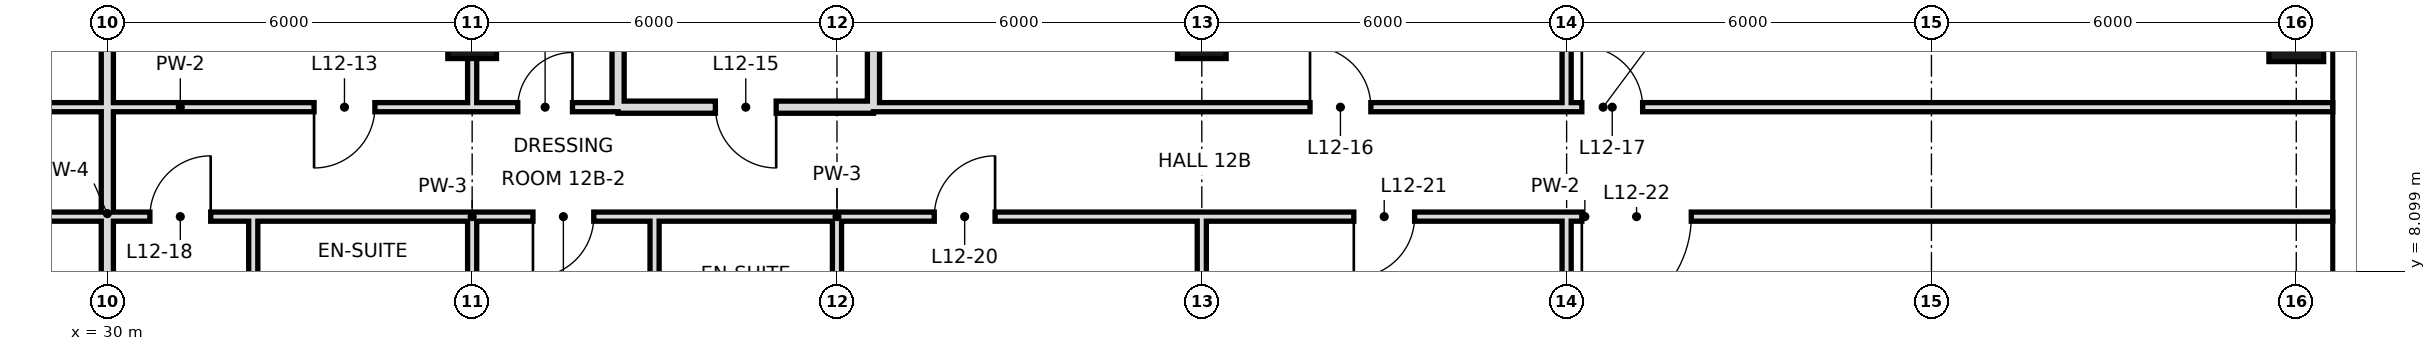
"""IFC4 building model, lengths in metres.
Left out: names, types, materials, properties, quantities, classifications, styles, units other than length and angle.
Written with IfcOpenShell. Run it as: python <this file> out.ifc"""

import sys

from ifc_helpers import new_model, si_unit, direction, frame, frame_2d, origin, origin_2d, place, context, subcontext, project, spatial, rectangle, hollow_rectangle, extrude, element, fill, save


model = new_model("IFC4")
c1 = context("Model", 3, precision=1e-05, world=origin(), true_north=direction((0.0, 1.0)))
c2 = subcontext(c1, "Body", "Model", "MODEL_VIEW")
j1 = project(units=[si_unit("LENGTHUNIT", "METRE"), si_unit("PLANEANGLEUNIT", "RADIAN")], contexts=[c1])
p1 = place(None, origin())
s1 = spatial("IfcSite", under=j1, at=p1, CompositionType="ELEMENT")
p2 = place(p1, origin())
s2 = spatial("IfcBuilding", under=s1, at=p2, CompositionType="ELEMENT")
p3 = place(p2, frame((0.0, 0.0, 64.2)))
s3 = spatial("IfcBuildingStorey", under=s2, at=p3, CompositionType="ELEMENT", Elevation=64.2)
for number, where, z_axis, x_axis in (
    (1, (36.0, 12.0, 0.0), (0.0, 0.0, 1.0), (1.0, 0.0, 0.0)),
    (2, (48.0, 12.0, 0.0), (0.0, 0.0, 1.0), (1.0, 0.0, 0.0)),
):
    element("IfcColumn", number, at=place(p3, frame(where, z_axis=z_axis, x_axis=x_axis)), inside=s3, PredefinedType="COLUMN", context=c2, shape_type="SweptSolid", body=[
        extrude(hollow_rectangle(XDim=0.8, YDim=0.8, WallThickness=0.04, at=origin_2d()), origin(), (0.0, 0.0, 1.0), 3.6),
    ])
p4 = place(p3, frame((66.0, 12.0, 0.0), z_axis=(0.0, 0.0, 1.0), x_axis=(1.0, 0.0, 0.0)))
e3 = element("IfcColumn", 3, at=p4, inside=s3, PredefinedType="COLUMN", context=c2, shape_type="SweptSolid", body=[
    extrude(hollow_rectangle(XDim=0.9, YDim=0.9, WallThickness=0.045, at=origin_2d()), origin(), (0.0, 0.0, 1.0), 3.6),
])
p5 = place(p3, frame((30.0, -0.6, 0.0), z_axis=(0.0, 0.0, 1.0), x_axis=(0.0, 1.0, 0.0)))
e4 = element("IfcWall", 4, at=p5, inside=s3, PredefinedType="SOLIDWALL", context=c2, shape_type="SweptSolid", body=[
    extrude(rectangle(XDim=19.3, YDim=0.2, at=frame_2d((9.65, 0.0))), origin(), (0.0, 0.0, 1.0), 2.72),
])
p6 = place(p3, frame((32.4, 6.0, 0.0), z_axis=(0.0, 0.0, 1.0), x_axis=(0.0, 1.0, 0.0)))
e5 = element("IfcWall", 5, at=p6, inside=s3, PredefinedType="PARTITIONING", context=c2, shape_type="SweptSolid", body=[
    extrude(rectangle(XDim=3.0, YDim=0.15, at=frame_2d((1.5, 0.0))), origin(), (0.0, 0.0, 1.0), 3.42),
])
p7 = place(p3, frame((36.0, 6.0, 0.0), z_axis=(0.0, 0.0, 1.0), x_axis=(0.0, 1.0, 0.0)))
e6 = element("IfcWall", 6, at=p7, inside=s3, PredefinedType="PARTITIONING", context=c2, shape_type="SweptSolid", body=[
    extrude(rectangle(XDim=3.0, YDim=0.15, at=frame_2d((1.5, 0.0))), origin(), (0.0, 0.0, 1.0), 2.72),
])
p8 = place(p3, frame((36.0, 10.8, 0.0), z_axis=(0.0, 0.0, 1.0), x_axis=(0.0, 1.0, 0.0)))
e7 = element("IfcWall", 7, at=p8, inside=s3, PredefinedType="PARTITIONING", context=c2, shape_type="SweptSolid", body=[
    extrude(rectangle(XDim=7.9, YDim=0.15, at=frame_2d((3.95, 0.0))), origin(), (0.0, 0.0, 1.0), 2.72),
])
p9 = place(p3, frame((38.4, 10.8, 0.0), z_axis=(0.0, 0.0, 1.0), x_axis=(0.0, 1.0, 0.0)))
e8 = element("IfcWall", 8, at=p9, inside=s3, PredefinedType="SOLIDWALL", context=c2, shape_type="SweptSolid", body=[
    extrude(rectangle(XDim=7.9, YDim=0.2, at=frame_2d((3.95, 0.0))), origin(), (0.0, 0.0, 1.0), 2.72),
])
p10 = place(p3, frame((39.0, 6.0, 0.0), z_axis=(0.0, 0.0, 1.0), x_axis=(0.0, 1.0, 0.0)))
e9 = element("IfcWall", 9, at=p10, inside=s3, PredefinedType="PARTITIONING", context=c2, shape_type="SweptSolid", body=[
    extrude(rectangle(XDim=3.0, YDim=0.15, at=frame_2d((1.5, 0.0))), origin(), (0.0, 0.0, 1.0), 3.42),
])
p11 = place(p3, frame((42.0, 6.0, 0.0), z_axis=(0.0, 0.0, 1.0), x_axis=(0.0, 1.0, 0.0)))
e10 = element("IfcWall", 10, at=p11, inside=s3, PredefinedType="PARTITIONING", context=c2, shape_type="SweptSolid", body=[
    extrude(rectangle(XDim=3.0, YDim=0.15, at=frame_2d((1.5, 0.0))), origin(), (0.0, 0.0, 1.0), 2.72),
])
p12 = place(p3, frame((42.6, 10.8, 0.0), z_axis=(0.0, 0.0, 1.0), x_axis=(0.0, 1.0, 0.0)))
e11 = element("IfcWall", 11, at=p12, inside=s3, PredefinedType="SOLIDWALL", context=c2, shape_type="SweptSolid", body=[
    extrude(rectangle(XDim=7.9, YDim=0.2, at=frame_2d((3.95, 0.0))), origin(), (0.0, 0.0, 1.0), 2.72),
])
p13 = place(p3, frame((48.0, 0.0, 0.0), z_axis=(0.0, 0.0, 1.0), x_axis=(0.0, 1.0, 0.0)))
e12 = element("IfcWall", 12, at=p13, inside=s3, PredefinedType="PARTITIONING", context=c2, shape_type="SweptSolid", body=[
    extrude(rectangle(XDim=9.0, YDim=0.15, at=frame_2d((4.5, 0.0))), origin(), (0.0, 0.0, 1.0), 2.72),
])
p14 = place(p3, frame((54.0, -0.6, 0.0), z_axis=(0.0, 0.0, 1.0), x_axis=(0.0, 1.0, 0.0)))
e13 = element("IfcWall", 13, at=p14, inside=s3, PredefinedType="PARTITIONING", context=c2, shape_type="SweptSolid", body=[
    extrude(rectangle(XDim=9.6, YDim=0.15, at=frame_2d((4.8, 0.0))), origin(), (0.0, 0.0, 1.0), 3.42),
])
p15 = place(p3, frame((54.0, 10.8, 0.0), z_axis=(0.0, 0.0, 1.0), x_axis=(0.0, 1.0, 0.0)))
e14 = element("IfcWall", 14, at=p15, inside=s3, PredefinedType="PARTITIONING", context=c2, shape_type="SweptSolid", body=[
    extrude(rectangle(XDim=7.2, YDim=0.15, at=frame_2d((3.6, 0.0))), origin(), (0.0, 0.0, 1.0), 3.42),
])
p16 = place(p3, frame((38.4, 10.8, 0.0), z_axis=(0.0, 0.0, 1.0), x_axis=(1.0, 0.0, 0.0)))
e15 = element("IfcWall", 15, at=p16, inside=s3, PredefinedType="SOLIDWALL", context=c2, shape_type="SweptSolid", body=[
    extrude(rectangle(XDim=4.2, YDim=0.2, at=frame_2d((2.1, 0.0))), origin(), (0.0, 0.0, 1.0), 2.72),
])
p17 = place(p16, frame((1.6, 0.0, 0.0)))
e16 = element("IfcOpeningElement", 16, at=p17, cuts=e15, PredefinedType="OPENING", context=c2, shape_type="SweptSolid", body=[
    extrude(rectangle(XDim=1.0, YDim=2.4, at=frame_2d((0.5, 1.2))), frame((0.0, 0.11, 0.0), z_axis=(0.0, -1.0, 0.0), x_axis=(1.0, 0.0, 0.0)), (0.0, 0.0, 1.0), 0.22),
])
p18 = place(p3, frame((26.4, 10.8, 0.0), z_axis=(0.0, 0.0, 1.0), x_axis=(1.0, 0.0, 0.0)))
e17 = element("IfcWall", 17, at=p18, inside=s3, PredefinedType="PARTITIONING", context=c2, shape_type="SweptSolid", body=[
    extrude(rectangle(XDim=9.6, YDim=0.15, at=frame_2d((4.8, 0.0))), origin(), (0.0, 0.0, 1.0), 3.42),
])
p19 = place(p18, frame((1.3, 0.0, 0.0)))
e18 = element("IfcOpeningElement", 18, at=p19, cuts=e17, PredefinedType="OPENING", context=c2, shape_type="SweptSolid", body=[
    extrude(rectangle(XDim=1.0, YDim=2.4, at=frame_2d((0.5, 1.2))), frame((0.0, 0.085, 0.0), z_axis=(0.0, -1.0, 0.0), x_axis=(1.0, 0.0, 0.0)), (0.0, 0.0, 1.0), 0.17),
])
p20 = place(p18, frame((7.0, 0.0, 0.0)))
e19 = element("IfcOpeningElement", 19, at=p20, cuts=e17, PredefinedType="OPENING", context=c2, shape_type="SweptSolid", body=[
    extrude(rectangle(XDim=1.0, YDim=2.4, at=frame_2d((0.5, 1.2))), frame((0.0, 0.085, 0.0), z_axis=(0.0, -1.0, 0.0), x_axis=(1.0, 0.0, 0.0)), (0.0, 0.0, 1.0), 0.17),
])
p21 = place(p3, frame((42.6, 10.8, 0.0), z_axis=(0.0, 0.0, 1.0), x_axis=(1.0, 0.0, 0.0)))
e20 = element("IfcWall", 20, at=p21, inside=s3, PredefinedType="PARTITIONING", context=c2, shape_type="SweptSolid", body=[
    extrude(rectangle(XDim=24.0, YDim=0.15, at=frame_2d((12.0, 0.0))), origin(), (0.0, 0.0, 1.0), 3.42),
])
p22 = place(p21, frame((7.18, 0.0, 0.0)))
e21 = element("IfcOpeningElement", 21, at=p22, cuts=e20, PredefinedType="OPENING", context=c2, shape_type="SweptSolid", body=[
    extrude(rectangle(XDim=1.0, YDim=2.4, at=frame_2d((0.5, 1.2))), frame((0.0, 0.085, 0.0), z_axis=(0.0, -1.0, 0.0), x_axis=(1.0, 0.0, 0.0)), (0.0, 0.0, 1.0), 0.17),
])
p23 = place(p21, frame((11.65, 0.0, 0.0)))
e22 = element("IfcOpeningElement", 22, at=p23, cuts=e20, PredefinedType="OPENING", context=c2, shape_type="SweptSolid", body=[
    extrude(rectangle(XDim=1.0, YDim=2.4, at=frame_2d((0.5, 1.2))), frame((0.0, 0.085, 0.0), z_axis=(0.0, -1.0, 0.0), x_axis=(1.0, 0.0, 0.0)), (0.0, 0.0, 1.0), 0.17),
])
p24 = place(p3, frame((36.0, 10.8, 0.0), z_axis=(0.0, 0.0, 1.0), x_axis=(1.0, 0.0, 0.0)))
e23 = element("IfcWall", 23, at=p24, inside=s3, PredefinedType="PARTITIONING", context=c2, shape_type="SweptSolid", body=[
    extrude(rectangle(XDim=2.4, YDim=0.15, at=frame_2d((1.2, 0.0))), origin(), (0.0, 0.0, 1.0), 3.42),
])
p25 = place(p24, frame((0.75, 0.0, 0.0)))
e24 = element("IfcOpeningElement", 24, at=p25, cuts=e23, PredefinedType="OPENING", context=c2, shape_type="SweptSolid", body=[
    extrude(rectangle(XDim=0.9, YDim=2.4, at=frame_2d((0.45, 1.2))), frame((0.0, 0.085, 0.0), z_axis=(0.0, -1.0, 0.0), x_axis=(1.0, 0.0, 0.0)), (0.0, 0.0, 1.0), 0.17),
])
p26 = place(p3, frame((30.0, 9.0, 0.0), z_axis=(0.0, 0.0, 1.0), x_axis=(1.0, 0.0, 0.0)))
e25 = element("IfcWall", 25, at=p26, inside=s3, PredefinedType="PARTITIONING", context=c2, shape_type="SweptSolid", body=[
    extrude(rectangle(XDim=2.4, YDim=0.15, at=frame_2d((1.2, 0.0))), origin(), (0.0, 0.0, 1.0), 3.42),
])
p27 = place(p26, frame((0.7, 0.0, 0.0)))
e26 = element("IfcOpeningElement", 26, at=p27, cuts=e25, PredefinedType="OPENING", context=c2, shape_type="SweptSolid", body=[
    extrude(rectangle(XDim=1.0, YDim=2.4, at=frame_2d((0.5, 1.2))), frame((0.0, 0.085, 0.0), z_axis=(0.0, -1.0, 0.0), x_axis=(1.0, 0.0, 0.0)), (0.0, 0.0, 1.0), 0.17),
])
p28 = place(p3, frame((36.0, 9.0, 0.0), z_axis=(0.0, 0.0, 1.0), x_axis=(1.0, 0.0, 0.0)))
e27 = element("IfcWall", 27, at=p28, inside=s3, PredefinedType="PARTITIONING", context=c2, shape_type="SweptSolid", body=[
    extrude(rectangle(XDim=3.0, YDim=0.15, at=frame_2d((1.5, 0.0))), origin(), (0.0, 0.0, 1.0), 3.42),
])
p29 = place(p28, frame((1.0, 0.0, 0.0)))
e28 = element("IfcOpeningElement", 28, at=p29, cuts=e27, PredefinedType="OPENING", context=c2, shape_type="SweptSolid", body=[
    extrude(rectangle(XDim=1.0, YDim=2.4, at=frame_2d((0.5, 1.2))), frame((0.0, 0.085, 0.0), z_axis=(0.0, -1.0, 0.0), x_axis=(1.0, 0.0, 0.0)), (0.0, 0.0, 1.0), 0.17),
])
p30 = place(p3, frame((42.0, 9.0, 0.0), z_axis=(0.0, 0.0, 1.0), x_axis=(1.0, 0.0, 0.0)))
e29 = element("IfcWall", 29, at=p30, inside=s3, PredefinedType="PARTITIONING", context=c2, shape_type="SweptSolid", body=[
    extrude(rectangle(XDim=24.6, YDim=0.15, at=frame_2d((12.3, 0.0))), origin(), (0.0, 0.0, 1.0), 3.42),
])
p31 = place(p30, frame((1.6, 0.0, 0.0)))
e30 = element("IfcOpeningElement", 30, at=p31, cuts=e29, PredefinedType="OPENING", context=c2, shape_type="SweptSolid", body=[
    extrude(rectangle(XDim=1.0, YDim=2.4, at=frame_2d((0.5, 1.2))), frame((0.0, 0.085, 0.0), z_axis=(0.0, -1.0, 0.0), x_axis=(1.0, 0.0, 0.0)), (0.0, 0.0, 1.0), 0.17),
])
p32 = place(p30, frame((8.5, 0.0, 0.0)))
e31 = element("IfcOpeningElement", 31, at=p32, cuts=e29, PredefinedType="OPENING", context=c2, shape_type="SweptSolid", body=[
    extrude(rectangle(XDim=1.0, YDim=2.4, at=frame_2d((0.5, 1.2))), frame((0.0, 0.085, 0.0), z_axis=(0.0, -1.0, 0.0), x_axis=(1.0, 0.0, 0.0)), (0.0, 0.0, 1.0), 0.17),
])
p33 = place(p30, frame((12.25, 0.0, 0.0)))
e32 = element("IfcOpeningElement", 32, at=p33, cuts=e29, PredefinedType="OPENING", context=c2, shape_type="SweptSolid", body=[
    extrude(rectangle(XDim=1.8, YDim=2.4, at=frame_2d((0.9, 1.2))), frame((0.0, 0.085, 0.0), z_axis=(0.0, -1.0, 0.0), x_axis=(1.0, 0.0, 0.0)), (0.0, 0.0, 1.0), 0.17),
])
for number, where, z_axis, x_axis in (
    (33, (26.4, 9.0, 0.0), (0.0, 0.0, 1.0), (1.0, 0.0, 0.0)),
    (34, (32.4, 9.0, 0.0), (0.0, 0.0, 1.0), (1.0, 0.0, 0.0)),
):
    element("IfcWall", number, at=place(p3, frame(where, z_axis=z_axis, x_axis=x_axis)), inside=s3, PredefinedType="PARTITIONING", context=c2, shape_type="SweptSolid", body=[
        extrude(rectangle(XDim=3.6, YDim=0.15, at=frame_2d((1.8, 0.0))), origin(), (0.0, 0.0, 1.0), 3.42),
    ])
p34 = place(p3, frame((39.0, 9.0, 0.0), z_axis=(0.0, 0.0, 1.0), x_axis=(1.0, 0.0, 0.0)))
e35 = element("IfcWall", 35, at=p34, inside=s3, PredefinedType="PARTITIONING", context=c2, shape_type="SweptSolid", body=[
    extrude(rectangle(XDim=3.0, YDim=0.15, at=frame_2d((1.5, 0.0))), origin(), (0.0, 0.0, 1.0), 3.42),
])
p35 = place(p20, frame((1.0, 0.0, 0.0), z_axis=(0.0, 0.0, 1.0), x_axis=(-1.0, 0.0, 0.0)))
e36 = element("IfcDoor", 36, at=p35, inside=s3, OperationType="SINGLE_SWING_RIGHT", PredefinedType="DOOR", context=c2, shape_type="SweptSolid", body=[
    extrude(rectangle(XDim=1.0, YDim=2.4, at=frame_2d((0.5, 1.2))), frame((0.0, 0.025, 0.0), z_axis=(0.0, -1.0, 0.0), x_axis=(1.0, 0.0, 0.0)), (0.0, 0.0, 1.0), 0.05),
])
fill(e19, e36)
p36 = place(p25, frame((0.9, 0.0, 0.0), z_axis=(0.0, 0.0, 1.0), x_axis=(-1.0, 0.0, 0.0)))
e37 = element("IfcDoor", 37, at=p36, inside=s3, OperationType="SINGLE_SWING_LEFT", PredefinedType="DOOR", context=c2, shape_type="SweptSolid", body=[
    extrude(rectangle(XDim=0.9, YDim=2.4, at=frame_2d((0.45, 1.2))), frame((0.0, 0.025, 0.0), z_axis=(0.0, -1.0, 0.0), x_axis=(1.0, 0.0, 0.0)), (0.0, 0.0, 1.0), 0.05),
])
fill(e24, e37)
p37 = place(p17, origin())
e38 = element("IfcDoor", 38, at=p37, inside=s3, OperationType="SINGLE_SWING_RIGHT", PredefinedType="DOOR", context=c2, shape_type="SweptSolid", body=[
    extrude(rectangle(XDim=1.0, YDim=2.4, at=frame_2d((0.5, 1.2))), frame((0.0, 0.025, 0.0), z_axis=(0.0, -1.0, 0.0), x_axis=(1.0, 0.0, 0.0)), (0.0, 0.0, 1.0), 0.05),
])
fill(e16, e38)
p38 = place(p22, origin())
e39 = element("IfcDoor", 39, at=p38, inside=s3, OperationType="SINGLE_SWING_LEFT", PredefinedType="DOOR", context=c2, shape_type="SweptSolid", body=[
    extrude(rectangle(XDim=1.0, YDim=2.4, at=frame_2d((0.5, 1.2))), frame((0.0, 0.025, 0.0), z_axis=(0.0, -1.0, 0.0), x_axis=(1.0, 0.0, 0.0)), (0.0, 0.0, 1.0), 0.05),
])
fill(e21, e39)
p39 = place(p23, origin())
e40 = element("IfcDoor", 40, at=p39, inside=s3, OperationType="SINGLE_SWING_LEFT", PredefinedType="DOOR", context=c2, shape_type="SweptSolid", body=[
    extrude(rectangle(XDim=1.0, YDim=2.4, at=frame_2d((0.5, 1.2))), frame((0.0, 0.025, 0.0), z_axis=(0.0, -1.0, 0.0), x_axis=(1.0, 0.0, 0.0)), (0.0, 0.0, 1.0), 0.05),
])
fill(e22, e40)
p40 = place(p27, frame((1.0, 0.0, 0.0), z_axis=(0.0, 0.0, 1.0), x_axis=(-1.0, 0.0, 0.0)))
e41 = element("IfcDoor", 41, at=p40, inside=s3, OperationType="SINGLE_SWING_LEFT", PredefinedType="DOOR", context=c2, shape_type="SweptSolid", body=[
    extrude(rectangle(XDim=1.0, YDim=2.4, at=frame_2d((0.5, 1.2))), frame((0.0, 0.025, 0.0), z_axis=(0.0, -1.0, 0.0), x_axis=(1.0, 0.0, 0.0)), (0.0, 0.0, 1.0), 0.05),
])
fill(e26, e41)
p41 = place(p29, frame((1.0, 0.0, 0.0), z_axis=(0.0, 0.0, 1.0), x_axis=(-1.0, 0.0, 0.0)))
e42 = element("IfcDoor", 42, at=p41, inside=s3, OperationType="SINGLE_SWING_RIGHT", PredefinedType="DOOR", context=c2, shape_type="SweptSolid", body=[
    extrude(rectangle(XDim=1.0, YDim=2.4, at=frame_2d((0.5, 1.2))), frame((0.0, 0.025, 0.0), z_axis=(0.0, -1.0, 0.0), x_axis=(1.0, 0.0, 0.0)), (0.0, 0.0, 1.0), 0.05),
])
fill(e28, e42)
p42 = place(p31, frame((1.0, 0.0, 0.0), z_axis=(0.0, 0.0, 1.0), x_axis=(-1.0, 0.0, 0.0)))
e43 = element("IfcDoor", 43, at=p42, inside=s3, OperationType="SINGLE_SWING_LEFT", PredefinedType="DOOR", context=c2, shape_type="SweptSolid", body=[
    extrude(rectangle(XDim=1.0, YDim=2.4, at=frame_2d((0.5, 1.2))), frame((0.0, 0.025, 0.0), z_axis=(0.0, -1.0, 0.0), x_axis=(1.0, 0.0, 0.0)), (0.0, 0.0, 1.0), 0.05),
])
fill(e30, e43)
p43 = place(p32, frame((1.0, 0.0, 0.0), z_axis=(0.0, 0.0, 1.0), x_axis=(-1.0, 0.0, 0.0)))
e44 = element("IfcDoor", 44, at=p43, inside=s3, OperationType="SINGLE_SWING_RIGHT", PredefinedType="DOOR", context=c2, shape_type="SweptSolid", body=[
    extrude(rectangle(XDim=1.0, YDim=2.4, at=frame_2d((0.5, 1.2))), frame((0.0, 0.025, 0.0), z_axis=(0.0, -1.0, 0.0), x_axis=(1.0, 0.0, 0.0)), (0.0, 0.0, 1.0), 0.05),
])
fill(e31, e44)
p44 = place(p33, frame((1.8, 0.0, 0.0), z_axis=(0.0, 0.0, 1.0), x_axis=(-1.0, 0.0, 0.0)))
e45 = element("IfcDoor", 45, at=p44, inside=s3, OperationType="SINGLE_SWING_RIGHT", PredefinedType="DOOR", context=c2, shape_type="SweptSolid", body=[
    extrude(rectangle(XDim=1.8, YDim=2.4, at=frame_2d((0.9, 1.2))), frame((0.0, 0.025, 0.0), z_axis=(0.0, -1.0, 0.0), x_axis=(1.0, 0.0, 0.0)), (0.0, 0.0, 1.0), 0.05),
])
fill(e32, e45)
save(model, sys.argv[1])
